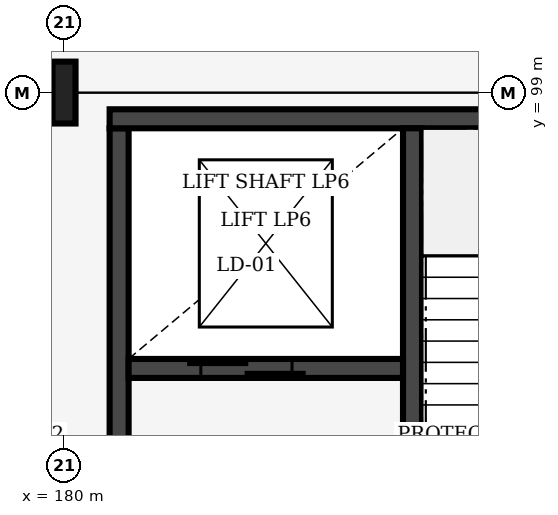
"""IFC4 building model, lengths in metres.
Left out: names, types, materials, properties, quantities, classifications, styles, units other than length and angle.
Written with IfcOpenShell. Run it as: python <this file> out.ifc"""

import sys

from ifc_helpers import new_model, si_unit, direction, frame, frame_2d, origin, origin_2d, place, context, subcontext, project, spatial, rectangle, i_section, extrude, element, fill, save


model = new_model("IFC4")
c1 = context("Model", 3, precision=1e-05, world=origin(), true_north=direction((0.0, 1.0)))
c2 = subcontext(c1, "Body", "Model", "MODEL_VIEW")
j1 = project(units=[si_unit("LENGTHUNIT", "METRE"), si_unit("PLANEANGLEUNIT", "RADIAN")], contexts=[c1])
p1 = place(None, origin())
s1 = spatial("IfcSite", under=j1, at=p1, CompositionType="ELEMENT")
p2 = place(p1, origin())
s2 = spatial("IfcBuilding", under=s1, at=p2, CompositionType="ELEMENT")
p3 = place(p2, origin())
s3 = spatial("IfcBuildingStorey", under=s2, at=p3, CompositionType="ELEMENT", Elevation=0.0)
p4 = place(p3, frame((180.0, 99.0, 0.0), z_axis=(0.0, 0.0, 1.0), x_axis=(1.0, 0.0, 0.0)))
e1 = element("IfcColumn", 1, at=p4, inside=s3, PredefinedType="COLUMN", context=c2, shape_type="SweptSolid", body=[
    extrude(i_section(OverallWidth=0.303, OverallDepth=0.814, WebThickness=0.021, FlangeThickness=0.04, FilletRadius=0.03, at=origin_2d()), origin(), (0.0, 0.0, 1.0), 6.0),
])
p5 = place(p3, frame((180.725, 90.47, 0.0), z_axis=(0.0, 0.0, 1.0), x_axis=(0.0, 1.0, 0.0)))
e2 = element("IfcWall", 2, at=p5, inside=s3, PredefinedType="SHEAR", context=c2, shape_type="SweptSolid", body=[
    extrude(rectangle(XDim=8.06, YDim=0.25, at=frame_2d((4.03, 0.0))), origin(), (0.0, 0.0, 1.0), 5.64),
])
p6 = place(p5, frame((1.15, 0.0, 0.0)))
e3 = element("IfcOpeningElement", 3, at=p6, cuts=e2, PredefinedType="OPENING", context=c2, shape_type="SweptSolid", body=[
    extrude(rectangle(XDim=1.6, YDim=2.2, at=frame_2d((0.8, 1.1))), frame((0.0, 0.135, 0.0), z_axis=(0.0, -1.0, 0.0), x_axis=(1.0, 0.0, 0.0)), (0.0, 0.0, 1.0), 0.27),
])
p7 = place(p3, frame((180.6, 98.655, 0.0), z_axis=(0.0, 0.0, 1.0), x_axis=(1.0, 0.0, 0.0)))
e4 = element("IfcWall", 4, at=p7, inside=s3, PredefinedType="SHEAR", context=c2, shape_type="SweptSolid", body=[
    extrude(rectangle(XDim=7.8, YDim=0.25, at=frame_2d((3.9, 0.0))), origin(), (0.0, 0.0, 1.0), 5.64),
])
p8 = place(p3, frame((184.585, 90.47, 0.0), z_axis=(0.0, 0.0, 1.0), x_axis=(0.0, 1.0, 0.0)))
e5 = element("IfcWall", 5, at=p8, inside=s3, PredefinedType="SHEAR", context=c2, shape_type="SweptSolid", body=[
    extrude(rectangle(XDim=8.06, YDim=0.25, at=frame_2d((4.03, 0.0))), origin(), (0.0, 0.0, 1.0), 5.64),
])
p9 = place(p8, frame((0.25, 0.0, 0.0)))
e6 = element("IfcOpeningElement", 6, at=p9, cuts=e5, PredefinedType="OPENING", context=c2, shape_type="SweptSolid", body=[
    extrude(rectangle(XDim=1.15, YDim=2.15, at=frame_2d((0.575, 1.075))), frame((0.0, 0.135, 0.0), z_axis=(0.0, -1.0, 0.0), x_axis=(1.0, 0.0, 0.0)), (0.0, 0.0, 1.0), 0.27),
])
p10 = place(p3, frame((180.85, 95.37, 0.0), z_axis=(0.0, 0.0, 1.0), x_axis=(1.0, 0.0, 0.0)))
e7 = element("IfcWall", 7, at=p10, inside=s3, PredefinedType="SHEAR", context=c2, shape_type="SweptSolid", body=[
    extrude(rectangle(XDim=3.61, YDim=0.25, at=frame_2d((1.805, 0.0))), origin(), (0.0, 0.0, 1.0), 5.64),
])
p11 = place(p10, frame((0.95, 0.0, 0.0)))
e8 = element("IfcOpeningElement", 8, at=p11, cuts=e7, PredefinedType="OPENING", context=c2, shape_type="SweptSolid", body=[
    extrude(rectangle(XDim=1.2, YDim=2.2, at=frame_2d((0.6, 1.1))), frame((0.0, 0.135, 0.0), z_axis=(0.0, -1.0, 0.0), x_axis=(1.0, 0.0, 0.0)), (0.0, 0.0, 1.0), 0.27),
])
p12 = place(p11, origin())
e9 = element("IfcDoor", 9, at=p12, inside=s3, OperationType="DOUBLE_DOOR_SLIDING", PredefinedType="DOOR", context=c2, shape_type="SweptSolid", body=[
    extrude(rectangle(XDim=1.2, YDim=2.2, at=frame_2d((0.6, 1.1))), frame((0.0, 0.025, 0.0), z_axis=(0.0, -1.0, 0.0), x_axis=(1.0, 0.0, 0.0)), (0.0, 0.0, 1.0), 0.05),
])
fill(e8, e9)
save(model, sys.argv[1])
